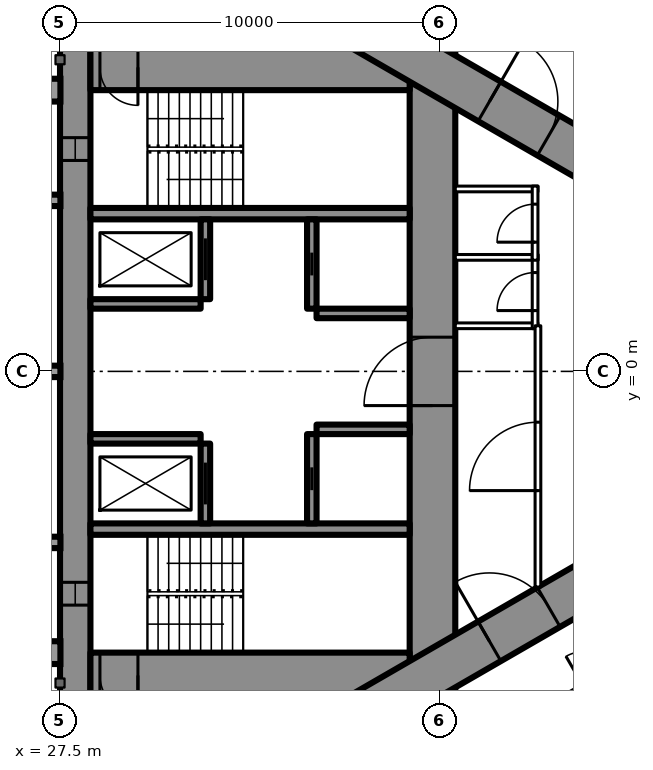
"""IFC4 building model, lengths in metres.
Left out: names, types, materials, properties, quantities, classifications, styles, units other than length and angle.
Written with IfcOpenShell. Run it as: python <this file> out.ifc"""

import sys

from ifc_helpers import new_model, si_unit, direction, frame, frame_2d, origin, place, context, subcontext, project, spatial, rectangle, extrude, element, fill, save


model = new_model("IFC4")
c1 = context("Model", 3, precision=1e-05, world=origin(), true_north=direction((0.0, 1.0)))
c2 = subcontext(c1, "Body", "Model", "MODEL_VIEW")
j1 = project(units=[si_unit("LENGTHUNIT", "METRE"), si_unit("PLANEANGLEUNIT", "RADIAN")], contexts=[c1])
p1 = place(None, origin())
s1 = spatial("IfcSite", under=j1, at=p1, CompositionType="ELEMENT")
p2 = place(p1, origin())
s2 = spatial("IfcBuilding", under=s1, at=p2, CompositionType="ELEMENT")
p3 = place(p2, frame((0.0, 0.0, 194.8)))
s3 = spatial("IfcBuildingStorey", under=s2, at=p3, CompositionType="ELEMENT", Elevation=194.8)
p4 = place(p3, frame((27.9, -8.6, 0.0), z_axis=(0.0, 0.0, 1.0), x_axis=(0.0, 1.0, 0.0)))
e1 = element("IfcWall", 1, at=p4, inside=s3, PredefinedType="SHEAR", context=c2, shape_type="SweptSolid", body=[
    extrude(rectangle(XDim=17.2, YDim=0.8, at=frame_2d((8.6, 0.0))), origin(), (0.0, 0.0, 1.0), 3.5),
])
p5 = place(p4, frame((2.45, 0.0, 0.6)))
e2 = element("IfcOpeningElement", 2, at=p5, cuts=e1, PredefinedType="OPENING", context=c2, shape_type="SweptSolid", body=[
    extrude(rectangle(XDim=0.6, YDim=2.1, at=frame_2d((0.3, 1.05))), frame((0.0, 0.41, 0.0), z_axis=(0.0, -1.0, 0.0), x_axis=(1.0, 0.0, 0.0)), (0.0, 0.0, 1.0), 0.82),
])
p6 = place(p4, frame((14.15, 0.0, 0.6)))
e3 = element("IfcOpeningElement", 3, at=p6, cuts=e1, PredefinedType="OPENING", context=c2, shape_type="SweptSolid", body=[
    extrude(rectangle(XDim=0.6, YDim=2.1, at=frame_2d((0.3, 1.05))), frame((0.0, 0.41, 0.0), z_axis=(0.0, -1.0, 0.0), x_axis=(1.0, 0.0, 0.0)), (0.0, 0.0, 1.0), 0.82),
])
p7 = place(p3, frame((37.3, -8.6, 0.0), z_axis=(0.0, 0.0, 1.0), x_axis=(0.0, 1.0, 0.0)))
e4 = element("IfcWall", 4, at=p7, inside=s3, PredefinedType="SHEAR", context=c2, shape_type="SweptSolid", body=[
    extrude(rectangle(XDim=17.2, YDim=1.2, at=frame_2d((8.6, 0.0))), origin(), (0.0, 0.0, 1.0), 3.5),
])
p8 = place(p7, frame((7.7, 0.0, 0.0)))
e5 = element("IfcOpeningElement", 5, at=p8, cuts=e4, PredefinedType="OPENING", context=c2, shape_type="SweptSolid", body=[
    extrude(rectangle(XDim=1.8, YDim=2.2, at=frame_2d((0.9, 1.1))), frame((0.0, 0.61, 0.0), z_axis=(0.0, -1.0, 0.0), x_axis=(1.0, 0.0, 0.0)), (0.0, 0.0, 1.0), 1.22),
])
p9 = place(p3, frame((28.3, -8.0, 0.0), z_axis=(0.0, 0.0, 1.0), x_axis=(1.0, 0.0, 0.0)))
e6 = element("IfcWall", 6, at=p9, inside=s3, PredefinedType="SHEAR", context=c2, shape_type="SweptSolid", body=[
    extrude(rectangle(XDim=8.4, YDim=1.2, at=frame_2d((4.2, 0.0))), origin(), (0.0, 0.0, 1.0), 3.5),
])
p10 = place(p9, frame((0.25, 0.0, 0.0)))
e7 = element("IfcOpeningElement", 7, at=p10, cuts=e6, PredefinedType="OPENING", context=c2, shape_type="SweptSolid", body=[
    extrude(rectangle(XDim=1.0, YDim=2.2, at=frame_2d((0.5, 1.1))), frame((0.0, 0.61, 0.0), z_axis=(0.0, -1.0, 0.0), x_axis=(1.0, 0.0, 0.0)), (0.0, 0.0, 1.0), 1.22),
])
p11 = place(p3, frame((28.3, 8.0, 0.0), z_axis=(0.0, 0.0, 1.0), x_axis=(1.0, 0.0, 0.0)))
e8 = element("IfcWall", 8, at=p11, inside=s3, PredefinedType="SHEAR", context=c2, shape_type="SweptSolid", body=[
    extrude(rectangle(XDim=8.4, YDim=1.2, at=frame_2d((4.2, 0.0))), origin(), (0.0, 0.0, 1.0), 3.5),
])
p12 = place(p11, frame((0.25, 0.0, 0.0)))
e9 = element("IfcOpeningElement", 9, at=p12, cuts=e8, PredefinedType="OPENING", context=c2, shape_type="SweptSolid", body=[
    extrude(rectangle(XDim=1.0, YDim=2.2, at=frame_2d((0.5, 1.1))), frame((0.0, 0.61, 0.0), z_axis=(0.0, -1.0, 0.0), x_axis=(1.0, 0.0, 0.0)), (0.0, 0.0, 1.0), 1.22),
])
for number, where, z_axis, x_axis in (
    (10, (28.3, -4.15, 0.0), (0.0, 0.0, 1.0), (1.0, 0.0, 0.0)),
    (11, (28.3, 4.15, 0.0), (0.0, 0.0, 1.0), (1.0, 0.0, 0.0)),
):
    element("IfcWall", number, at=place(p3, frame(where, z_axis=z_axis, x_axis=x_axis)), inside=s3, PredefinedType="SHEAR", context=c2, shape_type="SweptSolid", body=[
        extrude(rectangle(XDim=8.4, YDim=0.3, at=frame_2d((4.2, 0.0))), origin(), (0.0, 0.0, 1.0), 3.5),
    ])
p13 = place(p3, frame((31.325, -4.0, 0.0), z_axis=(0.0, 0.0, 1.0), x_axis=(0.0, 1.0, 0.0)))
e12 = element("IfcWall", 12, at=p13, inside=s3, PredefinedType="SHEAR", context=c2, shape_type="SweptSolid", body=[
    extrude(rectangle(XDim=2.1, YDim=0.25, at=frame_2d((1.05, 0.0))), origin(), (0.0, 0.0, 1.0), 3.5),
])
p14 = place(p13, frame((0.5, 0.0, 0.0)))
e13 = element("IfcOpeningElement", 13, at=p14, cuts=e12, PredefinedType="OPENING", context=c2, shape_type="SweptSolid", body=[
    extrude(rectangle(XDim=1.1, YDim=2.2, at=frame_2d((0.55, 1.1))), frame((0.0, 0.135, 0.0), z_axis=(0.0, -1.0, 0.0), x_axis=(1.0, 0.0, 0.0)), (0.0, 0.0, 1.0), 0.27),
])
p15 = place(p3, frame((34.125, -4.0, 0.0), z_axis=(0.0, 0.0, 1.0), x_axis=(0.0, 1.0, 0.0)))
e14 = element("IfcWall", 14, at=p15, inside=s3, PredefinedType="SHEAR", context=c2, shape_type="SweptSolid", body=[
    extrude(rectangle(XDim=2.35, YDim=0.25, at=frame_2d((1.175, 0.0))), origin(), (0.0, 0.0, 1.0), 3.5),
])
p16 = place(p15, frame((0.875, 0.0, 0.0)))
e15 = element("IfcOpeningElement", 15, at=p16, cuts=e14, PredefinedType="OPENING", context=c2, shape_type="SweptSolid", body=[
    extrude(rectangle(XDim=0.6, YDim=2.0, at=frame_2d((0.3, 1.0))), frame((0.0, 0.135, 0.0), z_axis=(0.0, -1.0, 0.0), x_axis=(1.0, 0.0, 0.0)), (0.0, 0.0, 1.0), 0.27),
])
p17 = place(p3, frame((28.3, -1.775, 0.0), z_axis=(0.0, 0.0, 1.0), x_axis=(1.0, 0.0, 0.0)))
e16 = element("IfcWall", 16, at=p17, inside=s3, PredefinedType="SHEAR", context=c2, shape_type="SweptSolid", body=[
    extrude(rectangle(XDim=2.9, YDim=0.25, at=frame_2d((1.45, 0.0))), origin(), (0.0, 0.0, 1.0), 3.5),
])
p18 = place(p3, frame((34.25, -1.525, 0.0), z_axis=(0.0, 0.0, 1.0), x_axis=(1.0, 0.0, 0.0)))
e17 = element("IfcWall", 17, at=p18, inside=s3, PredefinedType="SHEAR", context=c2, shape_type="SweptSolid", body=[
    extrude(rectangle(XDim=2.45, YDim=0.25, at=frame_2d((1.225, 0.0))), origin(), (0.0, 0.0, 1.0), 3.5),
])
p19 = place(p3, frame((31.325, 1.9, 0.0), z_axis=(0.0, 0.0, 1.0), x_axis=(0.0, 1.0, 0.0)))
e18 = element("IfcWall", 18, at=p19, inside=s3, PredefinedType="SHEAR", context=c2, shape_type="SweptSolid", body=[
    extrude(rectangle(XDim=2.1, YDim=0.25, at=frame_2d((1.05, 0.0))), origin(), (0.0, 0.0, 1.0), 3.5),
])
p20 = place(p19, frame((0.5, 0.0, 0.0)))
e19 = element("IfcOpeningElement", 19, at=p20, cuts=e18, PredefinedType="OPENING", context=c2, shape_type="SweptSolid", body=[
    extrude(rectangle(XDim=1.1, YDim=2.2, at=frame_2d((0.55, 1.1))), frame((0.0, 0.135, 0.0), z_axis=(0.0, -1.0, 0.0), x_axis=(1.0, 0.0, 0.0)), (0.0, 0.0, 1.0), 0.27),
])
p21 = place(p3, frame((34.125, 1.65, 0.0), z_axis=(0.0, 0.0, 1.0), x_axis=(0.0, 1.0, 0.0)))
e20 = element("IfcWall", 20, at=p21, inside=s3, PredefinedType="SHEAR", context=c2, shape_type="SweptSolid", body=[
    extrude(rectangle(XDim=2.35, YDim=0.25, at=frame_2d((1.175, 0.0))), origin(), (0.0, 0.0, 1.0), 3.5),
])
p22 = place(p21, frame((0.875, 0.0, 0.0)))
e21 = element("IfcOpeningElement", 21, at=p22, cuts=e20, PredefinedType="OPENING", context=c2, shape_type="SweptSolid", body=[
    extrude(rectangle(XDim=0.6, YDim=2.0, at=frame_2d((0.3, 1.0))), frame((0.0, 0.135, 0.0), z_axis=(0.0, -1.0, 0.0), x_axis=(1.0, 0.0, 0.0)), (0.0, 0.0, 1.0), 0.27),
])
p23 = place(p3, frame((28.3, 1.775, 0.0), z_axis=(0.0, 0.0, 1.0), x_axis=(1.0, 0.0, 0.0)))
e22 = element("IfcWall", 22, at=p23, inside=s3, PredefinedType="SHEAR", context=c2, shape_type="SweptSolid", body=[
    extrude(rectangle(XDim=2.9, YDim=0.25, at=frame_2d((1.45, 0.0))), origin(), (0.0, 0.0, 1.0), 3.5),
])
p24 = place(p3, frame((34.25, 1.525, 0.0), z_axis=(0.0, 0.0, 1.0), x_axis=(1.0, 0.0, 0.0)))
e23 = element("IfcWall", 23, at=p24, inside=s3, PredefinedType="SHEAR", context=c2, shape_type="SweptSolid", body=[
    extrude(rectangle(XDim=2.45, YDim=0.25, at=frame_2d((1.225, 0.0))), origin(), (0.0, 0.0, 1.0), 3.5),
])
p25 = place(p3, frame((27.2, -13.8, 0.0), z_axis=(0.0, 0.0, 1.0), x_axis=(0.866027159892, 0.499996958321, 0.0)))
e24 = element("IfcWall", 24, at=p25, inside=s3, PredefinedType="SHEAR", context=c2, shape_type="SweptSolid", body=[
    extrude(rectangle(XDim=27.947, YDim=1.2, at=frame_2d((13.973, 0.0))), origin(), (0.0, 0.0, 1.0), 3.5),
])
p26 = place(p25, frame((4.6, 0.0, 0.0)))
e25 = element("IfcOpeningElement", 25, at=p26, cuts=e24, PredefinedType="OPENING", context=c2, shape_type="SweptSolid", body=[
    extrude(rectangle(XDim=1.0, YDim=2.2, at=frame_2d((0.5, 1.1))), frame((0.0, 0.61, 0.0), z_axis=(0.0, -1.0, 0.0), x_axis=(1.0, 0.0, 0.0)), (0.0, 0.0, 1.0), 1.22),
])
p27 = place(p25, frame((13.395, 0.0, 0.0)))
e26 = element("IfcOpeningElement", 26, at=p27, cuts=e24, PredefinedType="OPENING", context=c2, shape_type="SweptSolid", body=[
    extrude(rectangle(XDim=1.8, YDim=2.2, at=frame_2d((0.9, 1.1))), frame((0.0, 0.61, 0.0), z_axis=(0.0, -1.0, 0.0), x_axis=(1.0, 0.0, 0.0)), (0.0, 0.0, 1.0), 1.22),
])
p28 = place(p3, frame((27.2, 13.8, 0.0), z_axis=(0.0, 0.0, 1.0), x_axis=(0.866024515034, -0.500001539357, 0.0)))
e27 = element("IfcWall", 27, at=p28, inside=s3, PredefinedType="SHEAR", context=c2, shape_type="SweptSolid", body=[
    extrude(rectangle(XDim=26.907, YDim=1.2, at=frame_2d((13.454, 0.0))), origin(), (0.0, 0.0, 1.0), 3.5),
])
p29 = place(p28, frame((4.6, 0.0, 0.0)))
e28 = element("IfcOpeningElement", 28, at=p29, cuts=e27, PredefinedType="OPENING", context=c2, shape_type="SweptSolid", body=[
    extrude(rectangle(XDim=1.0, YDim=2.2, at=frame_2d((0.5, 1.1))), frame((0.0, 0.61, 0.0), z_axis=(0.0, -1.0, 0.0), x_axis=(1.0, 0.0, 0.0)), (0.0, 0.0, 1.0), 1.22),
])
p30 = place(p28, frame((13.395, 0.0, 0.0)))
e29 = element("IfcOpeningElement", 29, at=p30, cuts=e27, PredefinedType="OPENING", context=c2, shape_type="SweptSolid", body=[
    extrude(rectangle(XDim=1.8, YDim=2.2, at=frame_2d((0.9, 1.1))), frame((0.0, 0.61, 0.0), z_axis=(0.0, -1.0, 0.0), x_axis=(1.0, 0.0, 0.0)), (0.0, 0.0, 1.0), 1.22),
])
p31 = place(p3, frame((27.959, -16.017, 0.0), z_axis=(0.0, 0.0, 1.0), x_axis=(0.866024151371, 0.500002169237, 0.0)))
e30 = element("IfcWall", 30, at=p31, inside=s3, PredefinedType="PARTITIONING", context=c2, shape_type="SweptSolid", body=[
    extrude(rectangle(XDim=32.034, YDim=0.2, at=frame_2d((16.017, 0.0))), origin(), (0.0, 0.0, 1.0), 3.25),
])
p32 = place(p31, frame((0.6, 0.0, 0.0)))
e31 = element("IfcOpeningElement", 31, at=p32, cuts=e30, PredefinedType="OPENING", context=c2, shape_type="SweptSolid", body=[
    extrude(rectangle(XDim=0.95, YDim=2.2, at=frame_2d((0.475, 1.1))), frame((0.0, 0.11, 0.0), z_axis=(0.0, -1.0, 0.0), x_axis=(1.0, 0.0, 0.0)), (0.0, 0.0, 1.0), 0.22),
])
p33 = place(p31, frame((13.132, 0.0, 0.0)))
e32 = element("IfcOpeningElement", 32, at=p33, cuts=e30, PredefinedType="OPENING", context=c2, shape_type="SweptSolid", body=[
    extrude(rectangle(XDim=0.95, YDim=2.2, at=frame_2d((0.475, 1.1))), frame((0.0, 0.11, 0.0), z_axis=(0.0, -1.0, 0.0), x_axis=(1.0, 0.0, 0.0)), (0.0, 0.0, 1.0), 0.22),
])
p34 = place(p31, frame((15.391, 0.0, 0.0)))
e33 = element("IfcOpeningElement", 33, at=p34, cuts=e30, PredefinedType="OPENING", context=c2, shape_type="SweptSolid", body=[
    extrude(rectangle(XDim=0.95, YDim=2.2, at=frame_2d((0.475, 1.1))), frame((0.0, 0.11, 0.0), z_axis=(0.0, -1.0, 0.0), x_axis=(1.0, 0.0, 0.0)), (0.0, 0.0, 1.0), 0.22),
])
p35 = place(p31, frame((19.441, 0.0, 0.0)))
e34 = element("IfcOpeningElement", 34, at=p35, cuts=e30, PredefinedType="OPENING", context=c2, shape_type="SweptSolid", body=[
    extrude(rectangle(XDim=0.95, YDim=2.2, at=frame_2d((0.475, 1.1))), frame((0.0, 0.11, 0.0), z_axis=(0.0, -1.0, 0.0), x_axis=(1.0, 0.0, 0.0)), (0.0, 0.0, 1.0), 0.22),
])
p36 = place(p31, frame((26.406, 0.0, 0.0)))
e35 = element("IfcOpeningElement", 35, at=p36, cuts=e30, PredefinedType="OPENING", context=c2, shape_type="SweptSolid", body=[
    extrude(rectangle(XDim=0.95, YDim=2.2, at=frame_2d((0.475, 1.1))), frame((0.0, 0.11, 0.0), z_axis=(0.0, -1.0, 0.0), x_axis=(1.0, 0.0, 0.0)), (0.0, 0.0, 1.0), 0.22),
])
p37 = place(p31, frame((28.87, 0.0, 0.0)))
e36 = element("IfcOpeningElement", 36, at=p37, cuts=e30, PredefinedType="OPENING", context=c2, shape_type="SweptSolid", body=[
    extrude(rectangle(XDim=1.8, YDim=2.2, at=frame_2d((0.9, 1.1))), frame((0.0, 0.11, 0.0), z_axis=(0.0, -1.0, 0.0), x_axis=(1.0, 0.0, 0.0)), (0.0, 0.0, 1.0), 0.22),
])
for number, where, z_axis, x_axis in (
    (37, (37.9, 1.2, 0.0), (0.0, 0.0, 1.0), (1.0, 0.0, 0.0)),
    (38, (37.9, 3.0, 0.0), (0.0, 0.0, 1.0), (1.0, 0.0, 0.0)),
    (39, (37.9, 4.8, 0.0), (0.0, 0.0, 1.0), (1.0, 0.0, 0.0)),
):
    element("IfcWall", number, at=place(p3, frame(where, z_axis=z_axis, x_axis=x_axis)), inside=s3, PredefinedType="PARTITIONING", context=c2, shape_type="SweptSolid", body=[
        extrude(rectangle(XDim=2.175, YDim=0.15, at=frame_2d((1.087, 0.0))), origin(), (0.0, 0.0, 1.0), 3.25),
    ])
p38 = place(p3, frame((40.0, 1.125, 0.0), z_axis=(0.0, 0.0, 1.0), x_axis=(0.0, 1.0, 0.0)))
e40 = element("IfcWall", 40, at=p38, inside=s3, PredefinedType="PARTITIONING", context=c2, shape_type="SweptSolid", body=[
    extrude(rectangle(XDim=1.95, YDim=0.15, at=frame_2d((0.975, 0.0))), origin(), (0.0, 0.0, 1.0), 3.25),
])
p39 = place(p38, frame((0.475, 0.0, 0.0)))
e41 = element("IfcOpeningElement", 41, at=p39, cuts=e40, PredefinedType="OPENING", context=c2, shape_type="SweptSolid", body=[
    extrude(rectangle(XDim=1.0, YDim=2.2, at=frame_2d((0.5, 1.1))), frame((0.0, 0.085, 0.0), z_axis=(0.0, -1.0, 0.0), x_axis=(1.0, 0.0, 0.0)), (0.0, 0.0, 1.0), 0.17),
])
p40 = place(p3, frame((40.0, 2.925, 0.0), z_axis=(0.0, 0.0, 1.0), x_axis=(0.0, 1.0, 0.0)))
e42 = element("IfcWall", 42, at=p40, inside=s3, PredefinedType="PARTITIONING", context=c2, shape_type="SweptSolid", body=[
    extrude(rectangle(XDim=1.95, YDim=0.15, at=frame_2d((0.975, 0.0))), origin(), (0.0, 0.0, 1.0), 3.25),
])
p41 = place(p40, frame((0.475, 0.0, 0.0)))
e43 = element("IfcOpeningElement", 43, at=p41, cuts=e42, PredefinedType="OPENING", context=c2, shape_type="SweptSolid", body=[
    extrude(rectangle(XDim=1.0, YDim=2.2, at=frame_2d((0.5, 1.1))), frame((0.0, 0.085, 0.0), z_axis=(0.0, -1.0, 0.0), x_axis=(1.0, 0.0, 0.0)), (0.0, 0.0, 1.0), 0.17),
])
p42 = place(p3, frame((40.075, -5.674, 0.0), z_axis=(0.0, 0.0, 1.0), x_axis=(0.0, 1.0, 0.0)))
e44 = element("IfcWall", 44, at=p42, inside=s3, PredefinedType="PARTITIONING", context=c2, shape_type="SweptSolid", body=[
    extrude(rectangle(XDim=6.874, YDim=0.15, at=frame_2d((3.437, 0.0))), origin(), (0.0, 0.0, 1.0), 3.25),
])
p43 = place(p42, frame((2.537, 0.0, 0.0)))
e45 = element("IfcOpeningElement", 45, at=p43, cuts=e44, PredefinedType="OPENING", context=c2, shape_type="SweptSolid", body=[
    extrude(rectangle(XDim=1.8, YDim=2.2, at=frame_2d((0.9, 1.1))), frame((0.0, 0.085, 0.0), z_axis=(0.0, -1.0, 0.0), x_axis=(1.0, 0.0, 0.0)), (0.0, 0.0, 1.0), 0.17),
])
p44 = place(p39, origin())
e46 = element("IfcDoor", 46, at=p44, inside=s3, OperationType="SINGLE_SWING_LEFT", PredefinedType="DOOR", context=c2, shape_type="SweptSolid", body=[
    extrude(rectangle(XDim=1.0, YDim=2.2, at=frame_2d((0.5, 1.1))), frame((0.0, 0.025, 0.0), z_axis=(0.0, -1.0, 0.0), x_axis=(1.0, 0.0, 0.0)), (0.0, 0.0, 1.0), 0.05),
])
fill(e41, e46)
p45 = place(p41, origin())
e47 = element("IfcDoor", 47, at=p45, inside=s3, OperationType="SINGLE_SWING_LEFT", PredefinedType="DOOR", context=c2, shape_type="SweptSolid", body=[
    extrude(rectangle(XDim=1.0, YDim=2.2, at=frame_2d((0.5, 1.1))), frame((0.0, 0.025, 0.0), z_axis=(0.0, -1.0, 0.0), x_axis=(1.0, 0.0, 0.0)), (0.0, 0.0, 1.0), 0.05),
])
fill(e43, e47)
p46 = place(p43, origin())
e48 = element("IfcDoor", 48, at=p46, inside=s3, OperationType="DOUBLE_DOOR_SINGLE_SWING", PredefinedType="DOOR", context=c2, shape_type="SweptSolid", body=[
    extrude(rectangle(XDim=1.8, YDim=2.2, at=frame_2d((0.9, 1.1))), frame((0.0, 0.025, 0.0), z_axis=(0.0, -1.0, 0.0), x_axis=(1.0, 0.0, 0.0)), (0.0, 0.0, 1.0), 0.05),
])
fill(e45, e48)
p47 = place(p27, origin())
e49 = element("IfcDoor", 49, at=p47, inside=s3, OperationType="DOUBLE_DOOR_SINGLE_SWING", PredefinedType="DOOR", context=c2, shape_type="SweptSolid", body=[
    extrude(rectangle(XDim=1.8, YDim=2.2, at=frame_2d((0.9, 1.1))), frame((0.0, 0.025, 0.0), z_axis=(0.0, -1.0, 0.0), x_axis=(1.0, 0.0, 0.0)), (0.0, 0.0, 1.0), 0.05),
])
fill(e26, e49)
p48 = place(p30, origin())
e50 = element("IfcDoor", 50, at=p48, inside=s3, OperationType="DOUBLE_DOOR_SINGLE_SWING", PredefinedType="DOOR", context=c2, shape_type="SweptSolid", body=[
    extrude(rectangle(XDim=1.8, YDim=2.2, at=frame_2d((0.9, 1.1))), frame((0.0, 0.025, 0.0), z_axis=(0.0, -1.0, 0.0), x_axis=(1.0, 0.0, 0.0)), (0.0, 0.0, 1.0), 0.05),
])
fill(e29, e50)
p49 = place(p8, origin())
e51 = element("IfcDoor", 51, at=p49, inside=s3, OperationType="DOUBLE_DOOR_SINGLE_SWING", PredefinedType="DOOR", context=c2, shape_type="SweptSolid", body=[
    extrude(rectangle(XDim=1.8, YDim=2.2, at=frame_2d((0.9, 1.1))), frame((0.0, 0.025, 0.0), z_axis=(0.0, -1.0, 0.0), x_axis=(1.0, 0.0, 0.0)), (0.0, 0.0, 1.0), 0.05),
])
fill(e5, e51)
p50 = place(p10, origin())
e52 = element("IfcDoor", 52, at=p50, inside=s3, OperationType="SINGLE_SWING_RIGHT", PredefinedType="DOOR", context=c2, shape_type="SweptSolid", body=[
    extrude(rectangle(XDim=1.0, YDim=2.2, at=frame_2d((0.5, 1.1))), frame((0.0, 0.025, 0.0), z_axis=(0.0, -1.0, 0.0), x_axis=(1.0, 0.0, 0.0)), (0.0, 0.0, 1.0), 0.05),
])
fill(e7, e52)
p51 = place(p12, origin())
e53 = element("IfcDoor", 53, at=p51, inside=s3, OperationType="SINGLE_SWING_RIGHT", PredefinedType="DOOR", context=c2, shape_type="SweptSolid", body=[
    extrude(rectangle(XDim=1.0, YDim=2.2, at=frame_2d((0.5, 1.1))), frame((0.0, 0.025, 0.0), z_axis=(0.0, -1.0, 0.0), x_axis=(1.0, 0.0, 0.0)), (0.0, 0.0, 1.0), 0.05),
])
fill(e9, e53)
p52 = place(p14, origin())
e54 = element("IfcDoor", 54, at=p52, inside=s3, OperationType="SLIDING_TO_LEFT", PredefinedType="USERDEFINED", context=c2, shape_type="SweptSolid", body=[
    extrude(rectangle(XDim=1.1, YDim=2.2, at=frame_2d((0.55, 1.1))), frame((0.0, 0.025, 0.0), z_axis=(0.0, -1.0, 0.0), x_axis=(1.0, 0.0, 0.0)), (0.0, 0.0, 1.0), 0.05),
])
fill(e13, e54)
p53 = place(p20, origin())
e55 = element("IfcDoor", 55, at=p53, inside=s3, OperationType="SLIDING_TO_LEFT", PredefinedType="USERDEFINED", context=c2, shape_type="SweptSolid", body=[
    extrude(rectangle(XDim=1.1, YDim=2.2, at=frame_2d((0.55, 1.1))), frame((0.0, 0.025, 0.0), z_axis=(0.0, -1.0, 0.0), x_axis=(1.0, 0.0, 0.0)), (0.0, 0.0, 1.0), 0.05),
])
fill(e19, e55)
p54 = place(p16, origin())
e56 = element("IfcDoor", 56, at=p54, inside=s3, OperationType="SLIDING_TO_LEFT", PredefinedType="DOOR", context=c2, shape_type="SweptSolid", body=[
    extrude(rectangle(XDim=0.6, YDim=2.0, at=frame_2d((0.3, 1.0))), frame((0.0, 0.025, 0.0), z_axis=(0.0, -1.0, 0.0), x_axis=(1.0, 0.0, 0.0)), (0.0, 0.0, 1.0), 0.05),
])
fill(e15, e56)
p55 = place(p22, origin())
e57 = element("IfcDoor", 57, at=p55, inside=s3, OperationType="SLIDING_TO_LEFT", PredefinedType="DOOR", context=c2, shape_type="SweptSolid", body=[
    extrude(rectangle(XDim=0.6, YDim=2.0, at=frame_2d((0.3, 1.0))), frame((0.0, 0.025, 0.0), z_axis=(0.0, -1.0, 0.0), x_axis=(1.0, 0.0, 0.0)), (0.0, 0.0, 1.0), 0.05),
])
fill(e21, e57)
p56 = place(p5, origin())
e58 = element("IfcWindow", 58, at=p56, inside=s3, PartitioningType="SINGLE_PANEL", PredefinedType="WINDOW", context=c2, shape_type="SweptSolid", body=[
    extrude(rectangle(XDim=0.6, YDim=2.1, at=frame_2d((0.3, 1.05))), frame((0.0, 0.03, 0.0), z_axis=(0.0, -1.0, 0.0), x_axis=(1.0, 0.0, 0.0)), (0.0, 0.0, 1.0), 0.06),
])
fill(e2, e58)
p57 = place(p6, origin())
e59 = element("IfcWindow", 59, at=p57, inside=s3, PartitioningType="SINGLE_PANEL", PredefinedType="WINDOW", context=c2, shape_type="SweptSolid", body=[
    extrude(rectangle(XDim=0.6, YDim=2.1, at=frame_2d((0.3, 1.05))), frame((0.0, 0.03, 0.0), z_axis=(0.0, -1.0, 0.0), x_axis=(1.0, 0.0, 0.0)), (0.0, 0.0, 1.0), 0.06),
])
fill(e3, e59)
save(model, sys.argv[1])
